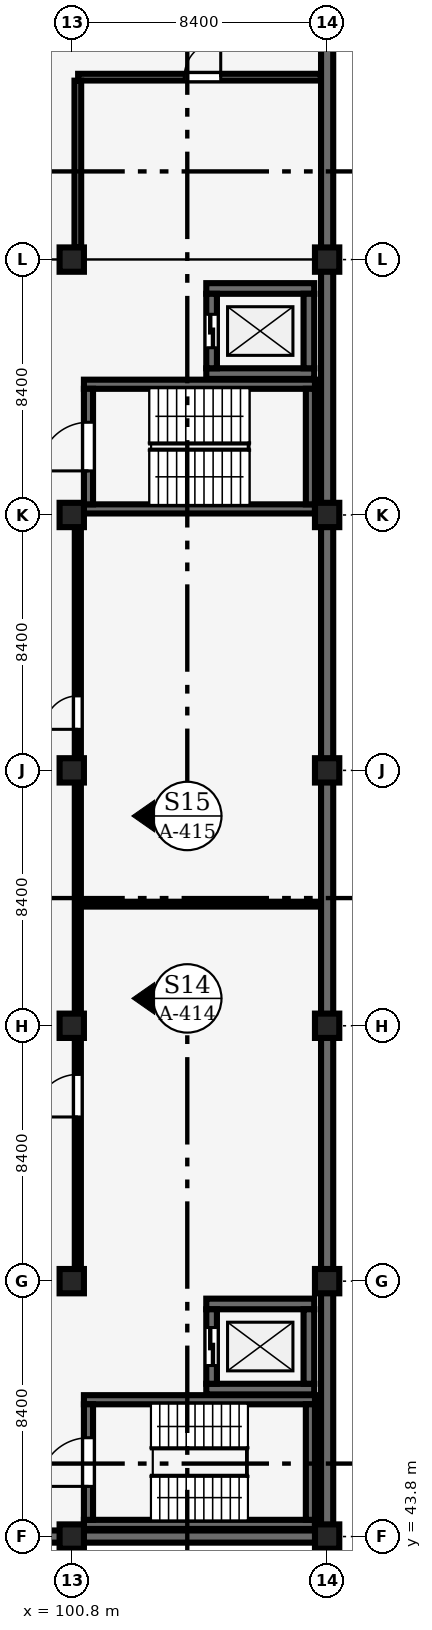
"""IFC4 building model, lengths in metres.
Left out: names, types, materials, properties, quantities, classifications, styles, units other than length and angle.
Written with IfcOpenShell. Run it as: python <this file> out.ifc"""

import sys

from ifc_helpers import new_model, si_unit, direction, frame, frame_2d, origin, origin_2d, place, context, subcontext, project, spatial, rectangle, extrude, element, fill, save


model = new_model("IFC4")
c1 = context("Model", 3, precision=1e-05, world=origin(), true_north=direction((0.0, 1.0)))
c2 = subcontext(c1, "Body", "Model", "MODEL_VIEW")
j1 = project(units=[si_unit("LENGTHUNIT", "METRE"), si_unit("PLANEANGLEUNIT", "RADIAN")], contexts=[c1])
p1 = place(None, origin())
s1 = spatial("IfcSite", under=j1, at=p1, CompositionType="ELEMENT")
p2 = place(p1, origin())
s2 = spatial("IfcBuilding", under=s1, at=p2, CompositionType="ELEMENT")
p3 = place(p2, frame((0.0, 0.0, -4.2)))
s3 = spatial("IfcBuildingStorey", under=s2, at=p3, CompositionType="ELEMENT", Elevation=-4.2)
for number, where, z_axis, x_axis in (
    (1, (100.8, 43.8, 0.0), (0.0, 0.0, 1.0), (1.0, 0.0, 0.0)),
    (2, (100.8, 52.2, 0.0), (0.0, 0.0, 1.0), (1.0, 0.0, 0.0)),
    (3, (100.8, 60.6, 0.0), (0.0, 0.0, 1.0), (1.0, 0.0, 0.0)),
    (4, (100.8, 69.0, 0.0), (0.0, 0.0, 1.0), (1.0, 0.0, 0.0)),
    (5, (100.8, 77.4, 0.0), (0.0, 0.0, 1.0), (1.0, 0.0, 0.0)),
    (6, (100.8, 85.8, 0.0), (0.0, 0.0, 1.0), (1.0, 0.0, 0.0)),
    (7, (109.2, 43.8, 0.0), (0.0, 0.0, 1.0), (1.0, 0.0, 0.0)),
    (8, (109.2, 52.2, 0.0), (0.0, 0.0, 1.0), (1.0, 0.0, 0.0)),
    (9, (109.2, 60.6, 0.0), (0.0, 0.0, 1.0), (1.0, 0.0, 0.0)),
    (10, (109.2, 69.0, 0.0), (0.0, 0.0, 1.0), (1.0, 0.0, 0.0)),
    (11, (109.2, 77.4, 0.0), (0.0, 0.0, 1.0), (1.0, 0.0, 0.0)),
    (12, (109.2, 85.8, 0.0), (0.0, 0.0, 1.0), (1.0, 0.0, 0.0)),
):
    element("IfcColumn", number, at=place(p3, frame(where, z_axis=z_axis, x_axis=x_axis)), inside=s3, PredefinedType="COLUMN", context=c2, shape_type="SweptSolid", body=[
        extrude(rectangle(XDim=0.8, YDim=0.8, at=origin_2d()), origin(), (0.0, 0.0, 1.0), 4.2),
    ])
p4 = place(p3, frame((109.2, 44.175, 0.0), z_axis=(0.0, 0.0, 1.0), x_axis=(0.0, 1.0, 0.0)))
e13 = element("IfcWall", 13, at=p4, inside=s3, PredefinedType="SHEAR", context=c2, shape_type="SweptSolid", body=[
    extrude(rectangle(XDim=7.65, YDim=0.4, at=frame_2d((3.825, 0.0))), origin(), (0.0, 0.0, 1.0), 3.05),
])
p5 = place(p3, frame((109.2, 52.575, 0.0), z_axis=(0.0, 0.0, 1.0), x_axis=(0.0, 1.0, 0.0)))
e14 = element("IfcWall", 14, at=p5, inside=s3, PredefinedType="SHEAR", context=c2, shape_type="SweptSolid", body=[
    extrude(rectangle(XDim=7.65, YDim=0.4, at=frame_2d((3.825, 0.0))), origin(), (0.0, 0.0, 1.0), 3.0),
])
p6 = place(p3, frame((109.2, 60.975, 0.0), z_axis=(0.0, 0.0, 1.0), x_axis=(0.0, 1.0, 0.0)))
e15 = element("IfcWall", 15, at=p6, inside=s3, PredefinedType="SHEAR", context=c2, shape_type="SweptSolid", body=[
    extrude(rectangle(XDim=7.65, YDim=0.4, at=frame_2d((3.825, 0.0))), origin(), (0.0, 0.0, 1.0), 3.0),
])
p7 = place(p3, frame((109.2, 69.375, 0.0), z_axis=(0.0, 0.0, 1.0), x_axis=(0.0, 1.0, 0.0)))
e16 = element("IfcWall", 16, at=p7, inside=s3, PredefinedType="SHEAR", context=c2, shape_type="SweptSolid", body=[
    extrude(rectangle(XDim=7.65, YDim=0.4, at=frame_2d((3.825, 0.0))), origin(), (0.0, 0.0, 1.0), 2.95),
])
p8 = place(p3, frame((109.2, 77.775, 0.0), z_axis=(0.0, 0.0, 1.0), x_axis=(0.0, 1.0, 0.0)))
e17 = element("IfcWall", 17, at=p8, inside=s3, PredefinedType="SHEAR", context=c2, shape_type="SweptSolid", body=[
    extrude(rectangle(XDim=7.65, YDim=0.4, at=frame_2d((3.825, 0.0))), origin(), (0.0, 0.0, 1.0), 2.9),
])
p9 = place(p3, frame((109.2, 86.175, 0.0), z_axis=(0.0, 0.0, 1.0), x_axis=(0.0, 1.0, 0.0)))
e18 = element("IfcWall", 18, at=p9, inside=s3, PredefinedType="SHEAR", context=c2, shape_type="SweptSolid", body=[
    extrude(rectangle(XDim=8.25, YDim=0.4, at=frame_2d((4.125, 0.0))), origin(), (0.0, 0.0, 1.0), 2.9),
])
p10 = place(p3, frame((92.775, 43.8, 0.0), z_axis=(0.0, 0.0, 1.0), x_axis=(1.0, 0.0, 0.0)))
e19 = element("IfcWall", 19, at=p10, inside=s3, PredefinedType="SHEAR", context=c2, shape_type="SweptSolid", body=[
    extrude(rectangle(XDim=7.65, YDim=0.4, at=frame_2d((3.825, 0.0))), origin(), (0.0, 0.0, 1.0), 3.25),
])
p11 = place(p3, frame((101.175, 43.8, 0.0), z_axis=(0.0, 0.0, 1.0), x_axis=(1.0, 0.0, 0.0)))
e20 = element("IfcWall", 20, at=p11, inside=s3, PredefinedType="SHEAR", context=c2, shape_type="SweptSolid", body=[
    extrude(rectangle(XDim=7.65, YDim=0.4, at=frame_2d((3.825, 0.0))), origin(), (0.0, 0.0, 1.0), 3.25),
])
for number, where, z_axis, x_axis in (
    (21, (101.2, 44.2, 0.0), (0.0, 0.0, 1.0), (1.0, 0.0, 0.0)),
    (22, (101.2, 48.3, 0.0), (0.0, 0.0, 1.0), (1.0, 0.0, 0.0)),
):
    element("IfcWall", number, at=place(p3, frame(where, z_axis=z_axis, x_axis=x_axis)), inside=s3, PredefinedType="SHEAR", context=c2, shape_type="SweptSolid", body=[
        extrude(rectangle(XDim=7.6, YDim=0.3, at=frame_2d((3.8, 0.0))), origin(), (0.0, 0.0, 1.0), 4.025),
    ])
p12 = place(p3, frame((101.35, 44.35, 0.0), z_axis=(0.0, 0.0, 1.0), x_axis=(0.0, 1.0, 0.0)))
e23 = element("IfcWall", 23, at=p12, inside=s3, PredefinedType="SHEAR", context=c2, shape_type="SweptSolid", body=[
    extrude(rectangle(XDim=3.8, YDim=0.3, at=frame_2d((1.9, 0.0))), origin(), (0.0, 0.0, 1.0), 4.025),
])
p13 = place(p12, frame((1.1, 0.0, 0.0)))
e24 = element("IfcOpeningElement", 24, at=p13, cuts=e23, PredefinedType="OPENING", context=c2, shape_type="SweptSolid", body=[
    extrude(rectangle(XDim=1.6, YDim=2.2, at=frame_2d((0.8, 1.1))), frame((0.0, 0.16, 0.0), z_axis=(0.0, -1.0, 0.0), x_axis=(1.0, 0.0, 0.0)), (0.0, 0.0, 1.0), 0.32),
])
p14 = place(p3, frame((108.65, 44.35, 0.0), z_axis=(0.0, 0.0, 1.0), x_axis=(0.0, 1.0, 0.0)))
e25 = element("IfcWall", 25, at=p14, inside=s3, PredefinedType="SHEAR", context=c2, shape_type="SweptSolid", body=[
    extrude(rectangle(XDim=3.8, YDim=0.3, at=frame_2d((1.9, 0.0))), origin(), (0.0, 0.0, 1.0), 4.025),
])
for number, where, z_axis, x_axis in (
    (26, (105.225, 48.65, 0.0), (0.0, 0.0, 1.0), (1.0, 0.0, 0.0)),
    (27, (105.225, 51.45, 0.0), (0.0, 0.0, 1.0), (1.0, 0.0, 0.0)),
):
    element("IfcWall", number, at=place(p3, frame(where, z_axis=z_axis, x_axis=x_axis)), inside=s3, PredefinedType="SHEAR", context=c2, shape_type="SweptSolid", body=[
        extrude(rectangle(XDim=3.55, YDim=0.35, at=frame_2d((1.775, 0.0))), origin(), (0.0, 0.0, 1.0), 3.92),
    ])
p15 = place(p3, frame((105.4, 48.825, 0.0), z_axis=(0.0, 0.0, 1.0), x_axis=(0.0, 1.0, 0.0)))
e28 = element("IfcWall", 28, at=p15, inside=s3, PredefinedType="SHEAR", context=c2, shape_type="SweptSolid", body=[
    extrude(rectangle(XDim=2.45, YDim=0.35, at=frame_2d((1.225, 0.0))), origin(), (0.0, 0.0, 1.0), 3.92),
])
p16 = place(p15, frame((0.6, 0.0, 0.0)))
e29 = element("IfcOpeningElement", 29, at=p16, cuts=e28, PredefinedType="OPENING", context=c2, shape_type="SweptSolid", body=[
    extrude(rectangle(XDim=1.25, YDim=2.25, at=frame_2d((0.625, 1.125))), frame((0.0, 0.185, 0.0), z_axis=(0.0, -1.0, 0.0), x_axis=(1.0, 0.0, 0.0)), (0.0, 0.0, 1.0), 0.37),
])
p17 = place(p3, frame((108.6, 48.825, 0.0), z_axis=(0.0, 0.0, 1.0), x_axis=(0.0, 1.0, 0.0)))
e30 = element("IfcWall", 30, at=p17, inside=s3, PredefinedType="SHEAR", context=c2, shape_type="SweptSolid", body=[
    extrude(rectangle(XDim=2.45, YDim=0.35, at=frame_2d((1.225, 0.0))), origin(), (0.0, 0.0, 1.0), 3.92),
])
for number, where, z_axis, x_axis in (
    (31, (101.2, 77.6, 0.0), (0.0, 0.0, 1.0), (1.0, 0.0, 0.0)),
    (32, (101.2, 81.7, 0.0), (0.0, 0.0, 1.0), (1.0, 0.0, 0.0)),
):
    element("IfcWall", number, at=place(p3, frame(where, z_axis=z_axis, x_axis=x_axis)), inside=s3, PredefinedType="SHEAR", context=c2, shape_type="SweptSolid", body=[
        extrude(rectangle(XDim=7.6, YDim=0.3, at=frame_2d((3.8, 0.0))), origin(), (0.0, 0.0, 1.0), 4.025),
    ])
p18 = place(p3, frame((101.35, 77.75, 0.0), z_axis=(0.0, 0.0, 1.0), x_axis=(0.0, 1.0, 0.0)))
e33 = element("IfcWall", 33, at=p18, inside=s3, PredefinedType="SHEAR", context=c2, shape_type="SweptSolid", body=[
    extrude(rectangle(XDim=3.8, YDim=0.3, at=frame_2d((1.9, 0.0))), origin(), (0.0, 0.0, 1.0), 4.025),
])
p19 = place(p18, frame((1.1, 0.0, 0.0)))
e34 = element("IfcOpeningElement", 34, at=p19, cuts=e33, PredefinedType="OPENING", context=c2, shape_type="SweptSolid", body=[
    extrude(rectangle(XDim=1.6, YDim=2.2, at=frame_2d((0.8, 1.1))), frame((0.0, 0.16, 0.0), z_axis=(0.0, -1.0, 0.0), x_axis=(1.0, 0.0, 0.0)), (0.0, 0.0, 1.0), 0.32),
])
p20 = place(p3, frame((108.65, 77.75, 0.0), z_axis=(0.0, 0.0, 1.0), x_axis=(0.0, 1.0, 0.0)))
e35 = element("IfcWall", 35, at=p20, inside=s3, PredefinedType="SHEAR", context=c2, shape_type="SweptSolid", body=[
    extrude(rectangle(XDim=3.8, YDim=0.3, at=frame_2d((1.9, 0.0))), origin(), (0.0, 0.0, 1.0), 4.025),
])
for number, where, z_axis, x_axis in (
    (36, (105.225, 82.05, 0.0), (0.0, 0.0, 1.0), (1.0, 0.0, 0.0)),
    (37, (105.225, 84.85, 0.0), (0.0, 0.0, 1.0), (1.0, 0.0, 0.0)),
):
    element("IfcWall", number, at=place(p3, frame(where, z_axis=z_axis, x_axis=x_axis)), inside=s3, PredefinedType="SHEAR", context=c2, shape_type="SweptSolid", body=[
        extrude(rectangle(XDim=3.55, YDim=0.35, at=frame_2d((1.775, 0.0))), origin(), (0.0, 0.0, 1.0), 3.92),
    ])
p21 = place(p3, frame((105.4, 82.225, 0.0), z_axis=(0.0, 0.0, 1.0), x_axis=(0.0, 1.0, 0.0)))
e38 = element("IfcWall", 38, at=p21, inside=s3, PredefinedType="SHEAR", context=c2, shape_type="SweptSolid", body=[
    extrude(rectangle(XDim=2.45, YDim=0.35, at=frame_2d((1.225, 0.0))), origin(), (0.0, 0.0, 1.0), 3.92),
])
p22 = place(p21, frame((0.675, 0.0, 0.0)))
e39 = element("IfcOpeningElement", 39, at=p22, cuts=e38, PredefinedType="OPENING", context=c2, shape_type="SweptSolid", body=[
    extrude(rectangle(XDim=1.1, YDim=2.2, at=frame_2d((0.55, 1.1))), frame((0.0, 0.185, 0.0), z_axis=(0.0, -1.0, 0.0), x_axis=(1.0, 0.0, 0.0)), (0.0, 0.0, 1.0), 0.37),
])
p23 = place(p3, frame((108.6, 82.225, 0.0), z_axis=(0.0, 0.0, 1.0), x_axis=(0.0, 1.0, 0.0)))
e40 = element("IfcWall", 40, at=p23, inside=s3, PredefinedType="SHEAR", context=c2, shape_type="SweptSolid", body=[
    extrude(rectangle(XDim=2.45, YDim=0.35, at=frame_2d((1.225, 0.0))), origin(), (0.0, 0.0, 1.0), 3.92),
])
p24 = place(p3, frame((101.01, 91.8, 0.0), z_axis=(0.0, 0.0, 1.0), x_axis=(1.0, 0.0, 0.0)))
e41 = element("IfcWall", 41, at=p24, inside=s3, PredefinedType="SOLIDWALL", context=c2, shape_type="SweptSolid", body=[
    extrude(rectangle(XDim=7.985, YDim=0.22, at=frame_2d((3.993, 0.0))), origin(), (0.0, 0.0, 1.0), 3.9),
])
p25 = place(p24, frame((3.49, 0.0, 0.0)))
e42 = element("IfcOpeningElement", 42, at=p25, cuts=e41, PredefinedType="OPENING", context=c2, shape_type="SweptSolid", body=[
    extrude(rectangle(XDim=1.2, YDim=2.4, at=frame_2d((0.6, 1.2))), frame((0.0, 0.12, 0.0), z_axis=(0.0, -1.0, 0.0), x_axis=(1.0, 0.0, 0.0)), (0.0, 0.0, 1.0), 0.24),
])
p26 = place(p3, frame((101.0, 86.21, 0.0), z_axis=(0.0, 0.0, 1.0), x_axis=(0.0, 1.0, 0.0)))
e43 = element("IfcWall", 43, at=p26, inside=s3, PredefinedType="SOLIDWALL", context=c2, shape_type="SweptSolid", body=[
    extrude(rectangle(XDim=5.475, YDim=0.22, at=frame_2d((2.738, 0.0))), origin(), (0.0, 0.0, 1.0), 3.25),
])
p27 = place(p3, frame((101.105, 64.6, 0.0), z_axis=(0.0, 0.0, 1.0), x_axis=(1.0, 0.0, 0.0)))
e44 = element("IfcWall", 44, at=p27, inside=s3, PredefinedType="PARTITIONING", context=c2, shape_type="SweptSolid", body=[
    extrude(rectangle(XDim=7.89, YDim=0.16, at=frame_2d((3.945, 0.0))), origin(), (0.0, 0.0, 1.0), 3.9),
])
p28 = place(p3, frame((101.0, 52.61, 0.0), z_axis=(0.0, 0.0, 1.0), x_axis=(0.0, 1.0, 0.0)))
e45 = element("IfcWall", 45, at=p28, inside=s3, PredefinedType="PARTITIONING", context=c2, shape_type="SweptSolid", body=[
    extrude(rectangle(XDim=7.58, YDim=0.2, at=frame_2d((3.79, 0.0))), origin(), (0.0, 0.0, 1.0), 2.85),
])
p29 = place(p28, frame((4.99, 0.0, 0.0)))
e46 = element("IfcOpeningElement", 46, at=p29, cuts=e45, PredefinedType="OPENING", context=c2, shape_type="SweptSolid", body=[
    extrude(rectangle(XDim=1.4, YDim=2.2, at=frame_2d((0.7, 1.1))), frame((0.0, 0.11, 0.0), z_axis=(0.0, -1.0, 0.0), x_axis=(1.0, 0.0, 0.0)), (0.0, 0.0, 1.0), 0.22),
])
p30 = place(p3, frame((101.0, 61.01, 0.0), z_axis=(0.0, 0.0, 1.0), x_axis=(0.0, 1.0, 0.0)))
e47 = element("IfcWall", 47, at=p30, inside=s3, PredefinedType="PARTITIONING", context=c2, shape_type="SweptSolid", body=[
    extrude(rectangle(XDim=7.58, YDim=0.2, at=frame_2d((3.79, 0.0))), origin(), (0.0, 0.0, 1.0), 2.8),
])
p31 = place(p3, frame((101.0, 69.41, 0.0), z_axis=(0.0, 0.0, 1.0), x_axis=(0.0, 1.0, 0.0)))
e48 = element("IfcWall", 48, at=p31, inside=s3, PredefinedType="PARTITIONING", context=c2, shape_type="SweptSolid", body=[
    extrude(rectangle(XDim=7.78, YDim=0.2, at=frame_2d((3.89, 0.0))), origin(), (0.0, 0.0, 1.0), 2.7),
])
p32 = place(p31, frame((0.94, 0.0, 0.0)))
e49 = element("IfcOpeningElement", 49, at=p32, cuts=e48, PredefinedType="OPENING", context=c2, shape_type="SweptSolid", body=[
    extrude(rectangle(XDim=1.1, YDim=2.15, at=frame_2d((0.55, 1.075))), frame((0.0, 0.11, 0.0), z_axis=(0.0, -1.0, 0.0), x_axis=(1.0, 0.0, 0.0)), (0.0, 0.0, 1.0), 0.22),
])
p33 = place(p13, origin())
e50 = element("IfcDoor", 50, at=p33, inside=s3, OperationType="DOUBLE_DOOR_SINGLE_SWING", PredefinedType="DOOR", context=c2, shape_type="SweptSolid", body=[
    extrude(rectangle(XDim=1.6, YDim=2.2, at=frame_2d((0.8, 1.1))), frame((0.0, 0.025, 0.0), z_axis=(0.0, -1.0, 0.0), x_axis=(1.0, 0.0, 0.0)), (0.0, 0.0, 1.0), 0.05),
])
fill(e24, e50)
p34 = place(p16, origin())
e51 = element("IfcDoor", 51, at=p34, inside=s3, OperationType="DOUBLE_DOOR_SLIDING", PredefinedType="DOOR", context=c2, shape_type="SweptSolid", body=[
    extrude(rectangle(XDim=1.25, YDim=2.25, at=frame_2d((0.625, 1.125))), frame((0.0, 0.025, 0.0), z_axis=(0.0, -1.0, 0.0), x_axis=(1.0, 0.0, 0.0)), (0.0, 0.0, 1.0), 0.05),
])
fill(e29, e51)
p35 = place(p19, origin())
e52 = element("IfcDoor", 52, at=p35, inside=s3, OperationType="DOUBLE_DOOR_SINGLE_SWING", PredefinedType="DOOR", context=c2, shape_type="SweptSolid", body=[
    extrude(rectangle(XDim=1.6, YDim=2.2, at=frame_2d((0.8, 1.1))), frame((0.0, 0.025, 0.0), z_axis=(0.0, -1.0, 0.0), x_axis=(1.0, 0.0, 0.0)), (0.0, 0.0, 1.0), 0.05),
])
fill(e34, e52)
p36 = place(p22, origin())
e53 = element("IfcDoor", 53, at=p36, inside=s3, OperationType="DOUBLE_DOOR_SLIDING", PredefinedType="DOOR", context=c2, shape_type="SweptSolid", body=[
    extrude(rectangle(XDim=1.1, YDim=2.2, at=frame_2d((0.55, 1.1))), frame((0.0, 0.025, 0.0), z_axis=(0.0, -1.0, 0.0), x_axis=(1.0, 0.0, 0.0)), (0.0, 0.0, 1.0), 0.05),
])
fill(e39, e53)
p37 = place(p25, origin())
e54 = element("IfcDoor", 54, at=p37, inside=s3, OperationType="SINGLE_SWING_RIGHT", PredefinedType="DOOR", context=c2, shape_type="SweptSolid", body=[
    extrude(rectangle(XDim=1.2, YDim=2.4, at=frame_2d((0.6, 1.2))), frame((0.0, 0.025, 0.0), z_axis=(0.0, -1.0, 0.0), x_axis=(1.0, 0.0, 0.0)), (0.0, 0.0, 1.0), 0.05),
])
fill(e42, e54)
p38 = place(p29, origin())
e55 = element("IfcDoor", 55, at=p38, inside=s3, OperationType="DOUBLE_DOOR_SINGLE_SWING", PredefinedType="DOOR", context=c2, shape_type="SweptSolid", body=[
    extrude(rectangle(XDim=1.4, YDim=2.2, at=frame_2d((0.7, 1.1))), frame((0.0, 0.025, 0.0), z_axis=(0.0, -1.0, 0.0), x_axis=(1.0, 0.0, 0.0)), (0.0, 0.0, 1.0), 0.05),
])
fill(e46, e55)
p39 = place(p32, origin())
e56 = element("IfcDoor", 56, at=p39, inside=s3, OperationType="SINGLE_SWING_LEFT", PredefinedType="DOOR", context=c2, shape_type="SweptSolid", body=[
    extrude(rectangle(XDim=1.1, YDim=2.15, at=frame_2d((0.55, 1.075))), frame((0.0, 0.025, 0.0), z_axis=(0.0, -1.0, 0.0), x_axis=(1.0, 0.0, 0.0)), (0.0, 0.0, 1.0), 0.05),
])
fill(e49, e56)
save(model, sys.argv[1])
